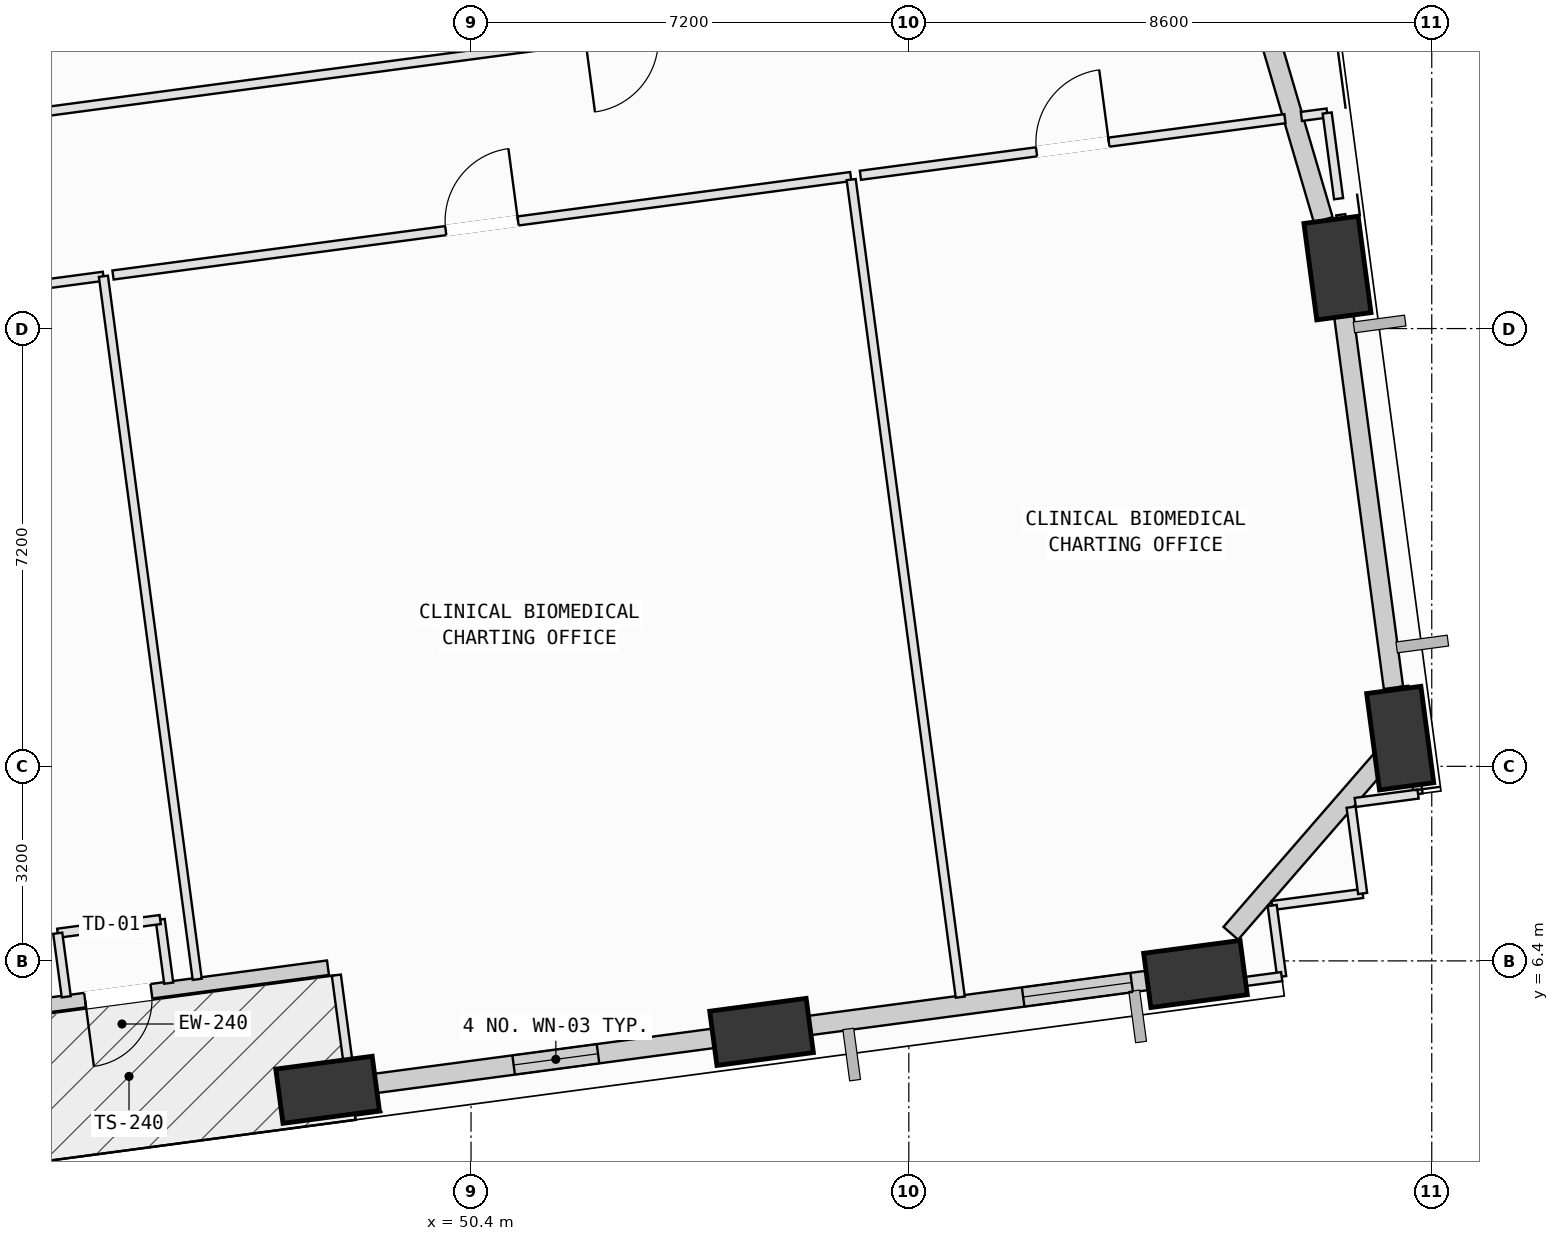
"""IFC4 building model, lengths in metres.
Left out: names, types, materials, properties, quantities, classifications, styles, units other than length and angle.
Written with IfcOpenShell. Run it as: python <this file> out.ifc"""

import sys

from ifc_helpers import new_model, si_unit, direction, frame, frame_2d, origin, origin_2d, place, context, subcontext, project, spatial, rectangle, extrude, element, fill, save


model = new_model("IFC4")
c1 = context("Model", 3, precision=1e-05, world=origin(), true_north=direction((0.0, 1.0)))
c2 = subcontext(c1, "Body", "Model", "MODEL_VIEW")
j1 = project(units=[si_unit("LENGTHUNIT", "METRE"), si_unit("PLANEANGLEUNIT", "RADIAN")], contexts=[c1])
p1 = place(None, origin())
s1 = spatial("IfcSite", under=j1, at=p1, CompositionType="ELEMENT")
p2 = place(p1, origin())
s2 = spatial("IfcBuilding", under=s1, at=p2, CompositionType="ELEMENT")
p3 = place(p2, frame((0.0, 0.0, 55.0)))
s3 = spatial("IfcBuildingStorey", under=s2, at=p3, CompositionType="ELEMENT", Elevation=55.0)
p4 = place(p3, frame((48.041, 4.28, 0.002), z_axis=(0.084091496112, 0.060212913762, 0.994637132475), x_axis=(-0.684023810281, 0.729331418583, 0.01367877322)))
e1 = element("IfcColumn", 1, at=p4, inside=s3, PredefinedType="COLUMN", context=c2, shape_type="SweptSolid", body=[
    extrude(rectangle(XDim=1.6, YDim=0.9, at=origin_2d()), origin(), (0.0, 0.0, 1.0), 4.018),
])
p5 = place(p3, frame((55.178, 5.232, 0.002), z_axis=(0.079750924179, 0.08945445868, 0.992792873622), x_axis=(-0.82725165899, 0.561607933278, 0.015849983506)))
e2 = element("IfcColumn", 2, at=p5, inside=s3, PredefinedType="COLUMN", context=c2, shape_type="SweptSolid", body=[
    extrude(rectangle(XDim=1.6, YDim=0.9, at=origin_2d()), origin(), (0.0, 0.0, 1.0), 4.026),
])
p6 = place(p3, frame((62.314, 6.184, 0.002), z_axis=(0.075420837867, 0.118483898461, 0.990087502709), x_axis=(-0.906496036526, 0.421805500861, 0.018575661659)))
e3 = element("IfcColumn", 3, at=p6, inside=s3, PredefinedType="COLUMN", context=c2, shape_type="SweptSolid", body=[
    extrude(rectangle(XDim=1.6, YDim=0.9, at=origin_2d()), origin(), (0.0, 0.0, 1.0), 4.037),
])
p7 = place(p3, frame((65.681, 10.064, 0.002), z_axis=(0.059355618192, 0.132069272658, 0.989461781884), x_axis=(-0.281414427626, -0.948792526854, 0.143522335926)))
e4 = element("IfcColumn", 4, at=p7, inside=s3, PredefinedType="COLUMN", context=c2, shape_type="SweptSolid", body=[
    extrude(rectangle(XDim=1.6, YDim=0.9, at=origin_2d()), origin(), (0.0, 0.0, 1.0), 4.039),
])
p8 = place(p3, frame((64.649, 17.795, 0.002), z_axis=(0.027737563791, 0.127847155378, 0.991405937251), x_axis=(-0.079107913013, -0.988396190327, 0.129672314108)))
e5 = element("IfcColumn", 5, at=p8, inside=s3, PredefinedType="COLUMN", context=c2, shape_type="SweptSolid", body=[
    extrude(rectangle(XDim=1.6, YDim=0.9, at=origin_2d()), origin(), (0.0, 0.0, 1.0), 4.031),
])
p9 = place(p3, frame((48.047, 6.288, 0.0), z_axis=(0.0, 0.0, 1.0), x_axis=(-0.991216868142, -0.132246437799, 0.0)))
e6 = element("IfcWall", 6, at=p9, inside=s3, PredefinedType="SOLIDWALL", context=c2, shape_type="SweptSolid", body=[
    extrude(rectangle(XDim=6.96, YDim=0.24, at=frame_2d((3.48, 0.0))), origin(), (0.0, 0.0, 1.0), 3.165),
])
p10 = place(p9, frame((2.93, 0.0, 0.0)))
e7 = element("IfcOpeningElement", 7, at=p10, cuts=e6, PredefinedType="OPENING", context=c2, shape_type="SweptSolid", body=[
    extrude(rectangle(XDim=1.1, YDim=2.15, at=frame_2d((0.55, 1.075))), frame((0.0, 0.13, 0.0), z_axis=(0.0, -1.0, 0.0), x_axis=(1.0, 0.0, 0.0)), (0.0, 0.0, 1.0), 0.26),
])
p11 = place(p3, frame((54.777, 5.178, 0.0), z_axis=(0.0, 0.0, 1.0), x_axis=(-0.991215483708, -0.132256814029, 0.0)))
e8 = element("IfcWall", 8, at=p11, inside=s3, PredefinedType="SOLIDWALL", context=c2, shape_type="SweptSolid", body=[
    extrude(rectangle(XDim=6.012, YDim=0.32, at=frame_2d((3.006, 0.0))), origin(), (0.0, 0.0, 1.0), 3.145),
])
p12 = place(p11, frame((2.309, 0.0, 0.75)))
e9 = element("IfcOpeningElement", 9, at=p12, cuts=e8, PredefinedType="OPENING", context=c2, shape_type="SweptSolid", body=[
    extrude(rectangle(XDim=1.4, YDim=1.85, at=frame_2d((0.7, 0.925))), frame((0.0, 0.17, 0.0), z_axis=(0.0, -1.0, 0.0), x_axis=(1.0, 0.0, 0.0)), (0.0, 0.0, 1.0), 0.34),
])
p13 = place(p3, frame((61.933, 6.133, 0.0), z_axis=(0.0, 0.0, 1.0), x_axis=(-0.991212725831, -0.132277481647, 0.0)))
e10 = element("IfcWall", 10, at=p13, inside=s3, PredefinedType="SOLIDWALL", context=c2, shape_type="SweptSolid", body=[
    extrude(rectangle(XDim=6.045, YDim=0.32, at=frame_2d((3.022, 0.0))), origin(), (0.0, 0.0, 1.0), 3.165),
])
p14 = place(p13, frame((0.674, 0.0, 0.75)))
e11 = element("IfcOpeningElement", 11, at=p14, cuts=e10, PredefinedType="OPENING", context=c2, shape_type="SweptSolid", body=[
    extrude(rectangle(XDim=1.8, YDim=2.05, at=frame_2d((0.9, 1.025))), frame((0.0, 0.17, 0.0), z_axis=(0.0, -1.0, 0.0), x_axis=(1.0, 0.0, 0.0)), (0.0, 0.0, 1.0), 0.34),
])
p15 = place(p3, frame((65.47, 9.82, 0.0), z_axis=(0.0, 0.0, 1.0), x_axis=(-0.655427370607, -0.755258208733, 0.0)))
e12 = element("IfcWall", 12, at=p15, inside=s3, PredefinedType="SOLIDWALL", context=c2, shape_type="SweptSolid", body=[
    extrude(rectangle(XDim=3.927, YDim=0.32, at=frame_2d((1.964, 0.0))), origin(), (0.0, 0.0, 1.0), 3.165),
])
p16 = place(p3, frame((64.696, 17.445, 0.0), z_axis=(0.0, 0.0, 1.0), x_axis=(0.132294355664, -0.991210473845, 0.0)))
e13 = element("IfcWall", 13, at=p16, inside=s3, PredefinedType="SOLIDWALL", context=c2, shape_type="SweptSolid", body=[
    extrude(rectangle(XDim=6.61, YDim=0.32, at=frame_2d((3.305, 0.0))), origin(), (0.0, 0.0, 1.0), 3.165),
])
p17 = place(p3, frame((61.985, 26.851, 0.0), z_axis=(0.0, 0.0, 1.0), x_axis=(0.282177065207, -0.959362342325, 0.0)))
e14 = element("IfcWall", 14, at=p17, inside=s3, PredefinedType="SOLIDWALL", context=c2, shape_type="SweptSolid", body=[
    extrude(rectangle(XDim=8.614, YDim=0.32, at=frame_2d((4.307, 0.0))), origin(), (0.0, 0.0, 1.0), 3.165),
])
p18 = place(p3, frame((36.5, 16.612, 0.0), z_axis=(0.0, 0.0, 1.0), x_axis=(0.991217133431, 0.132244449384, 0.0)))
e15 = element("IfcWall", 15, at=p18, inside=s3, PredefinedType="PARTITIONING", context=c2, shape_type="SweptSolid", body=[
    extrude(rectangle(XDim=7.924, YDim=0.15, at=frame_2d((3.962, 0.0))), origin(), (0.0, 0.0, 1.0), 3.78),
])
p19 = place(p18, frame((3.362, 0.0, 0.0)))
e16 = element("IfcOpeningElement", 16, at=p19, cuts=e15, PredefinedType="OPENING", context=c2, shape_type="SweptSolid", body=[
    extrude(rectangle(XDim=1.2, YDim=2.15, at=frame_2d((0.6, 1.075))), frame((0.0, 0.085, 0.0), z_axis=(0.0, -1.0, 0.0), x_axis=(1.0, 0.0, 0.0)), (0.0, 0.0, 1.0), 0.17),
])
p20 = place(p3, frame((44.354, 17.66, 0.0), z_axis=(0.0, 0.0, 1.0), x_axis=(0.132267904737, -0.991214003824, 0.0)))
e17 = element("IfcWall", 17, at=p20, inside=s3, PredefinedType="PARTITIONING", context=c2, shape_type="SweptSolid", body=[
    extrude(rectangle(XDim=11.666, YDim=0.15, at=frame_2d((5.833, 0.0))), origin(), (0.0, 0.0, 1.0), 3.78),
])
p21 = place(p3, frame((45.428, 6.034, 0.0), z_axis=(0.0, 0.0, 1.0), x_axis=(-0.132542498532, 0.991177323229, 0.0)))
e18 = element("IfcWall", 18, at=p21, inside=s3, PredefinedType="PARTITIONING", context=c2, shape_type="SweptSolid", body=[
    extrude(rectangle(XDim=1.055, YDim=0.15, at=frame_2d((0.528, 0.0))), origin(), (0.0, 0.0, 1.0), 3.78),
])
p22 = place(p3, frame((45.288, 7.08, 0.0), z_axis=(0.0, 0.0, 1.0), x_axis=(-0.99119526041, -0.132408291814, 0.0)))
e19 = element("IfcWall", 19, at=p22, inside=s3, PredefinedType="PARTITIONING", context=c2, shape_type="SweptSolid", body=[
    extrude(rectangle(XDim=1.7, YDim=0.15, at=frame_2d((0.85, 0.0))), origin(), (0.0, 0.0, 1.0), 3.78),
])
p23 = place(p3, frame((43.603, 6.855, 0.0), z_axis=(0.0, 0.0, 1.0), x_axis=(0.132694613072, -0.991156970243, 0.0)))
e20 = element("IfcWall", 20, at=p23, inside=s3, PredefinedType="PARTITIONING", context=c2, shape_type="SweptSolid", body=[
    extrude(rectangle(XDim=1.054, YDim=0.15, at=frame_2d((0.527, 0.0))), origin(), (0.0, 0.0, 1.0), 3.78),
])
p24 = place(p3, frame((44.512, 17.681, 0.0), z_axis=(0.0, 0.0, 1.0), x_axis=(0.991212913697, 0.13227607388, 0.0)))
e21 = element("IfcWall", 21, at=p24, inside=s3, PredefinedType="PARTITIONING", context=c2, shape_type="SweptSolid", body=[
    extrude(rectangle(XDim=12.241, YDim=0.15, at=frame_2d((6.12, 0.0))), origin(), (0.0, 0.0, 1.0), 3.78),
])
p25 = place(p24, frame((5.52, 0.0, 0.0)))
e22 = element("IfcOpeningElement", 22, at=p25, cuts=e21, PredefinedType="OPENING", context=c2, shape_type="SweptSolid", body=[
    extrude(rectangle(XDim=1.2, YDim=2.15, at=frame_2d((0.6, 1.075))), frame((0.0, 0.085, 0.0), z_axis=(0.0, -1.0, 0.0), x_axis=(1.0, 0.0, 0.0)), (0.0, 0.0, 1.0), 0.17),
])
p26 = place(p3, frame((56.652, 19.25, 0.0), z_axis=(0.0, 0.0, 1.0), x_axis=(0.132246241303, -0.991216894358, 0.0)))
e23 = element("IfcWall", 23, at=p26, inside=s3, PredefinedType="PARTITIONING", context=c2, shape_type="SweptSolid", body=[
    extrude(rectangle(XDim=13.565, YDim=0.15, at=frame_2d((6.783, 0.0))), origin(), (0.0, 0.0, 1.0), 3.78),
])
p27 = place(p3, frame((55.972, 5.105, 0.0), z_axis=(0.0, 0.0, 1.0), x_axis=(-0.991244237637, -0.132041135074, 0.0)))
e24 = element("IfcWall", 24, at=p27, inside=s3, PredefinedType="PARTITIONING", context=c2, shape_type="SweptSolid", body=[
    extrude(rectangle(XDim=1.174, YDim=0.15, at=frame_2d((0.587, 0.0))), origin(), (0.0, 0.0, 1.0), 3.78),
])
p28 = place(p3, frame((48.46, 4.103, 0.0), z_axis=(0.0, 0.0, 1.0), x_axis=(-0.132148345288, 0.991229950535, 0.0)))
e25 = element("IfcWall", 25, at=p28, inside=s3, PredefinedType="PARTITIONING", context=c2, shape_type="SweptSolid", body=[
    extrude(rectangle(XDim=2.08, YDim=0.15, at=frame_2d((1.04, 0.0))), origin(), (0.0, 0.0, 1.0), 3.78),
])
p29 = place(p3, frame((65.063, 7.509, 0.0), z_axis=(0.0, 0.0, 1.0), x_axis=(-0.991252046454, -0.131982500357, 0.0)))
e26 = element("IfcWall", 26, at=p29, inside=s3, PredefinedType="PARTITIONING", context=c2, shape_type="SweptSolid", body=[
    extrude(rectangle(XDim=1.5, YDim=0.15, at=frame_2d((0.75, 0.0))), origin(), (0.0, 0.0, 1.0), 3.78),
])
p30 = place(p3, frame((63.576, 7.311, 0.0), z_axis=(0.0, 0.0, 1.0), x_axis=(0.132177269218, -0.991226094038, 0.0)))
e27 = element("IfcWall", 27, at=p30, inside=s3, PredefinedType="PARTITIONING", context=c2, shape_type="SweptSolid", body=[
    extrude(rectangle(XDim=1.18, YDim=0.15, at=frame_2d((0.59, 0.0))), origin(), (0.0, 0.0, 1.0), 3.78),
])
p31 = place(p3, frame((63.732, 6.141, 0.0), z_axis=(0.0, 0.0, 1.0), x_axis=(-0.991212362594, -0.132280203509, 0.0)))
e28 = element("IfcWall", 28, at=p31, inside=s3, PredefinedType="PARTITIONING", context=c2, shape_type="SweptSolid", body=[
    extrude(rectangle(XDim=1.785, YDim=0.15, at=frame_2d((0.892, 0.0))), origin(), (0.0, 0.0, 1.0), 3.78),
])
p32 = place(p3, frame((56.804, 19.321, 0.0), z_axis=(0.0, 0.0, 1.0), x_axis=(0.991228203394, 0.132161449736, 0.0)))
e29 = element("IfcWall", 29, at=p32, inside=s3, PredefinedType="PARTITIONING", context=c2, shape_type="SweptSolid", body=[
    extrude(rectangle(XDim=7.044, YDim=0.15, at=frame_2d((3.522, 0.0))), origin(), (0.0, 0.0, 1.0), 3.78),
])
p33 = place(p32, frame((2.922, 0.0, 0.0)))
e30 = element("IfcOpeningElement", 30, at=p33, cuts=e29, PredefinedType="OPENING", context=c2, shape_type="SweptSolid", body=[
    extrude(rectangle(XDim=1.2, YDim=2.15, at=frame_2d((0.6, 1.075))), frame((0.0, 0.085, 0.0), z_axis=(0.0, -1.0, 0.0), x_axis=(1.0, 0.0, 0.0)), (0.0, 0.0, 1.0), 0.17),
])
p34 = place(p3, frame((64.056, 20.289, 0.0), z_axis=(0.0, 0.0, 1.0), x_axis=(0.991421237805, 0.130705505733, 0.0)))
e31 = element("IfcWall", 31, at=p34, inside=s3, PredefinedType="PARTITIONING", context=c2, shape_type="SweptSolid", body=[
    extrude(rectangle(XDim=0.428, YDim=0.15, at=frame_2d((0.214, 0.0))), origin(), (0.0, 0.0, 1.0), 3.78),
])
p35 = place(p3, frame((64.48, 20.345, 0.0), z_axis=(0.0, 0.0, 1.0), x_axis=(0.132253723782, -0.991215896032, 0.0)))
e32 = element("IfcWall", 32, at=p35, inside=s3, PredefinedType="PARTITIONING", context=c2, shape_type="SweptSolid", body=[
    extrude(rectangle(XDim=1.421, YDim=0.15, at=frame_2d((0.711, 0.0))), origin(), (0.0, 0.0, 1.0), 3.165),
])
p36 = place(p3, frame((64.703, 18.672, 0.0), z_axis=(0.0, 0.0, 1.0), x_axis=(0.132532001564, -0.991178726851, 0.0)))
e33 = element("IfcWall", 33, at=p36, inside=s3, PredefinedType="PARTITIONING", context=c2, shape_type="SweptSolid", body=[
    extrude(rectangle(XDim=1.216, YDim=0.15, at=frame_2d((0.608, 0.0))), origin(), (0.0, 0.0, 1.0), 3.165),
])
p37 = place(p3, frame((65.739, 10.915, 0.0), z_axis=(0.0, 0.0, 1.0), x_axis=(0.132136868171, -0.991231480569, 0.0)))
e34 = element("IfcWall", 34, at=p37, inside=s3, PredefinedType="PARTITIONING", context=c2, shape_type="SweptSolid", body=[
    extrude(rectangle(XDim=1.787, YDim=0.15, at=frame_2d((0.893, 0.0))), origin(), (0.0, 0.0, 1.0), 3.165),
])
p38 = place(p3, frame((65.975, 9.144, 0.0), z_axis=(0.0, 0.0, 1.0), x_axis=(-0.991205385142, -0.132332476986, 0.0)))
e35 = element("IfcWall", 35, at=p38, inside=s3, PredefinedType="PARTITIONING", context=c2, shape_type="SweptSolid", body=[
    extrude(rectangle(XDim=1.042, YDim=0.15, at=frame_2d((0.521, 0.0))), origin(), (0.0, 0.0, 1.0), 3.78),
])
p39 = place(p3, frame((64.874, 8.928, 0.0), z_axis=(0.0, 0.0, 1.0), x_axis=(0.132007316967, -0.991248741874, 0.0)))
e36 = element("IfcWall", 36, at=p39, inside=s3, PredefinedType="PARTITIONING", context=c2, shape_type="SweptSolid", body=[
    extrude(rectangle(XDim=1.431, YDim=0.15, at=frame_2d((0.716, 0.0))), origin(), (0.0, 0.0, 1.0), 3.78),
])
p40 = place(p3, frame((62.983, 22.98, 0.0), z_axis=(0.0, 0.0, 1.0), x_axis=(-0.99121859397, -0.132233501686, 0.0)))
e37 = element("IfcWall", 37, at=p40, inside=s3, PredefinedType="PARTITIONING", context=c2, shape_type="SweptSolid", body=[
    extrude(rectangle(XDim=20.396, YDim=0.15, at=frame_2d((10.198, 0.0))), origin(), (0.0, 0.0, 1.0), 3.78),
])
p41 = place(p40, frame((9.598, 0.0, 0.0)))
e38 = element("IfcOpeningElement", 38, at=p41, cuts=e37, PredefinedType="OPENING", context=c2, shape_type="SweptSolid", body=[
    extrude(rectangle(XDim=1.2, YDim=2.15, at=frame_2d((0.6, 1.075))), frame((0.0, 0.085, 0.0), z_axis=(0.0, -1.0, 0.0), x_axis=(1.0, 0.0, 0.0)), (0.0, 0.0, 1.0), 0.17),
])
p42 = place(p10, origin())
e39 = element("IfcDoor", 39, at=p42, inside=s3, OperationType="SINGLE_SWING_RIGHT", PredefinedType="DOOR", context=c2, shape_type="SweptSolid", body=[
    extrude(rectangle(XDim=1.1, YDim=2.15, at=frame_2d((0.55, 1.075))), frame((0.0, 0.025, 0.0), z_axis=(0.0, -1.0, 0.0), x_axis=(1.0, 0.0, 0.0)), (0.0, 0.0, 1.0), 0.05),
])
fill(e7, e39)
p43 = place(p12, origin())
e40 = element("IfcWindow", 40, at=p43, inside=s3, PartitioningType="SINGLE_PANEL", PredefinedType="WINDOW", context=c2, shape_type="SweptSolid", body=[
    extrude(rectangle(XDim=1.4, YDim=1.85, at=frame_2d((0.7, 0.925))), frame((0.0, 0.03, 0.0), z_axis=(0.0, -1.0, 0.0), x_axis=(1.0, 0.0, 0.0)), (0.0, 0.0, 1.0), 0.06),
])
fill(e9, e40)
p44 = place(p14, origin())
e41 = element("IfcWindow", 41, at=p44, inside=s3, PartitioningType="SINGLE_PANEL", PredefinedType="WINDOW", context=c2, shape_type="SweptSolid", body=[
    extrude(rectangle(XDim=1.8, YDim=2.05, at=frame_2d((0.9, 1.025))), frame((0.0, 0.03, 0.0), z_axis=(0.0, -1.0, 0.0), x_axis=(1.0, 0.0, 0.0)), (0.0, 0.0, 1.0), 0.06),
])
fill(e11, e41)
p45 = place(p25, origin())
e42 = element("IfcDoor", 42, at=p45, inside=s3, OperationType="SINGLE_SWING_RIGHT", PredefinedType="DOOR", context=c2, shape_type="SweptSolid", body=[
    extrude(rectangle(XDim=1.2, YDim=2.15, at=frame_2d((0.6, 1.075))), frame((0.0, 0.025, 0.0), z_axis=(0.0, -1.0, 0.0), x_axis=(1.0, 0.0, 0.0)), (0.0, 0.0, 1.0), 0.05),
])
fill(e22, e42)
p46 = place(p33, origin())
e43 = element("IfcDoor", 43, at=p46, inside=s3, OperationType="SINGLE_SWING_RIGHT", PredefinedType="DOOR", context=c2, shape_type="SweptSolid", body=[
    extrude(rectangle(XDim=1.2, YDim=2.15, at=frame_2d((0.6, 1.075))), frame((0.0, 0.025, 0.0), z_axis=(0.0, -1.0, 0.0), x_axis=(1.0, 0.0, 0.0)), (0.0, 0.0, 1.0), 0.05),
])
fill(e30, e43)
save(model, sys.argv[1])
